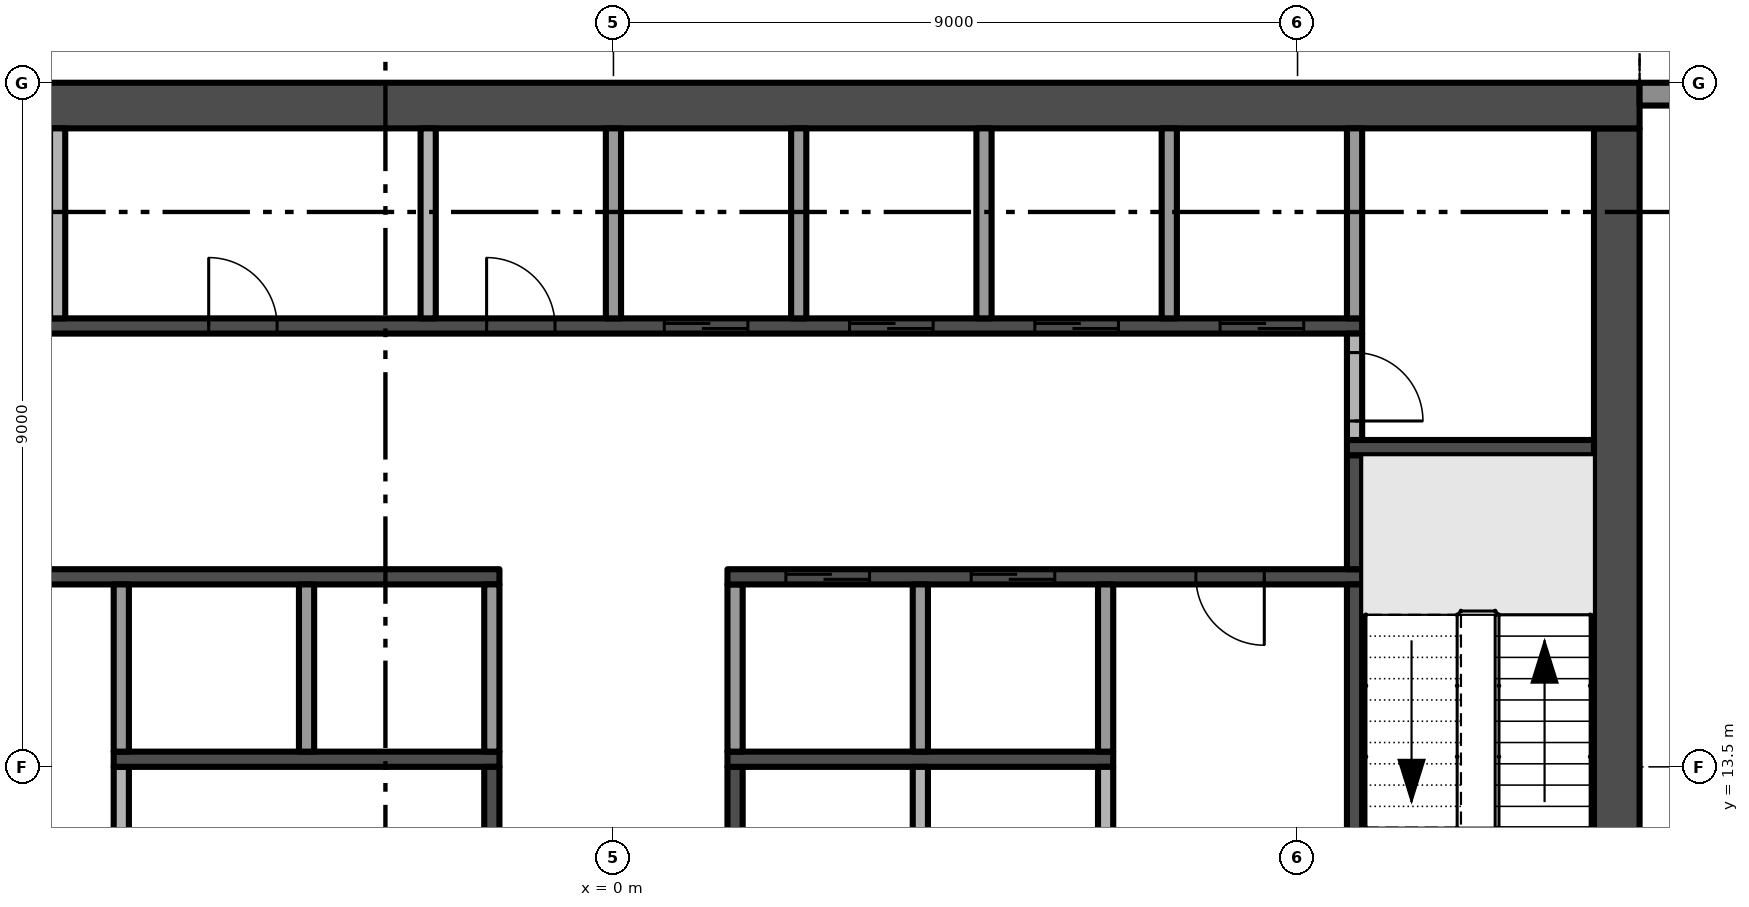
"""IFC4 building model, lengths in metres.
Left out: names, types, materials, properties, quantities, classifications, styles, units other than length and angle.
Written with IfcOpenShell. Run it as: python <this file> out.ifc"""

import sys

from ifc_helpers import new_model, si_unit, direction, frame, frame_2d, origin, place, context, subcontext, project, spatial, polyline, rectangle, outline, extrude, element, fill, save


model = new_model("IFC4")
c1 = context("Model", 3, precision=1e-05, world=origin(), true_north=direction((0.0, 1.0)))
c2 = subcontext(c1, "Body", "Model", "MODEL_VIEW")
j1 = project(units=[si_unit("LENGTHUNIT", "METRE"), si_unit("PLANEANGLEUNIT", "RADIAN")], contexts=[c1])
p1 = place(None, origin())
s1 = spatial("IfcSite", under=j1, at=p1, CompositionType="ELEMENT")
p2 = place(p1, origin())
s2 = spatial("IfcBuilding", under=s1, at=p2, CompositionType="ELEMENT")
p3 = place(p2, frame((0.0, 0.0, 254.0)))
s3 = spatial("IfcBuildingStorey", under=s2, at=p3, CompositionType="ELEMENT", Elevation=254.0)
p4 = place(p3, frame((13.2, 5.1, -0.3), z_axis=(0.0, 0.0, 1.0), x_axis=(0.0, 1.0, 0.0)))
e1 = element("IfcWall", 1, at=p4, inside=s3, PredefinedType="SHEAR", context=c2, shape_type="SweptSolid", body=[
    extrude(rectangle(XDim=16.8, YDim=0.6, at=frame_2d((8.4, 0.0))), origin(), (0.0, 0.0, 1.0), 3.8),
])
p5 = place(p4, frame((6.3, 0.0, 0.3)))
e2 = element("IfcOpeningElement", 2, at=p5, cuts=e1, PredefinedType="OPENING", context=c2, shape_type="SweptSolid", body=[
    extrude(rectangle(XDim=1.2, YDim=2.2, at=frame_2d((0.6, 1.1))), frame((0.0, 0.31, 0.0), z_axis=(0.0, -1.0, 0.0), x_axis=(1.0, 0.0, 0.0)), (0.0, 0.0, 1.0), 0.62),
])
p6 = place(p3, frame((13.5, 22.2, -0.3), z_axis=(0.0, 0.0, 1.0), x_axis=(-1.0, 0.0, 0.0)))
e3 = element("IfcWall", 3, at=p6, inside=s3, PredefinedType="SHEAR", context=c2, shape_type="SweptSolid", body=[
    extrude(rectangle(XDim=27.0, YDim=0.6, at=frame_2d((13.5, 0.0))), origin(), (0.0, 0.0, 1.0), 3.8),
])
p7 = place(p3, frame((13.5, 22.35, 0.0), z_axis=(0.0, 0.0, 1.0), x_axis=(1.0, 0.0, 0.0)))
e4 = element("IfcWall", 4, at=p7, inside=s3, PredefinedType="SOLIDWALL", context=c2, shape_type="SweptSolid", body=[
    extrude(rectangle(XDim=4.05, YDim=0.3, at=frame_2d((2.025, 0.0))), origin(), (0.0, 0.0, 1.0), 3.5),
])
p8 = place(p7, frame((0.55, 0.0, 0.45)))
e5 = element("IfcOpeningElement", 5, at=p8, cuts=e4, PredefinedType="OPENING", context=c2, shape_type="SweptSolid", body=[
    extrude(rectangle(XDim=3.2, YDim=2.65, at=frame_2d((1.6, 1.325))), frame((0.0, 0.16, 0.0), z_axis=(0.0, -1.0, 0.0), x_axis=(1.0, 0.0, 0.0)), (0.0, 0.0, 1.0), 0.32),
])
p9 = place(p3, origin())
e6 = element("IfcWall", 6, at=p9, inside=s3, PredefinedType="USERDEFINED", context=c2, shape_type="SweptSolid", body=[
    extrude(outline(polyline([(22.5, 25.149), (21.0, 24.488), (19.5, 23.755), (18.0, 23.231), (16.875, 23.1), (16.5, 23.115), (15.0, 23.451), (13.5, 24.112), (13.399, 23.883), (14.921, 23.213), (16.467, 22.866), (16.885, 22.849), (18.056, 22.986), (19.596, 23.524), (21.105, 24.261), (22.601, 24.92), (22.5, 25.149)])), origin(), (0.0, 0.0, 1.0), 0.9),
])
p10 = place(p3, frame((-1.5, 16.0, 0.0), z_axis=(0.0, 0.0, 1.0), x_axis=(-1.0, 0.0, 0.0)))
e7 = element("IfcWall", 7, at=p10, inside=s3, PredefinedType="SHEAR", context=c2, shape_type="SweptSolid", body=[
    extrude(rectangle(XDim=8.35, YDim=0.2, at=frame_2d((4.175, 0.0))), origin(), (0.0, 0.0, 1.0), 3.5),
])
p11 = place(p10, frame((6.162, 0.0, 0.0)))
e8 = element("IfcOpeningElement", 8, at=p11, cuts=e7, PredefinedType="OPENING", context=c2, shape_type="SweptSolid", body=[
    extrude(rectangle(XDim=0.9, YDim=2.1, at=frame_2d((0.45, 1.05))), frame((0.0, 0.11, 0.0), z_axis=(0.0, -1.0, 0.0), x_axis=(1.0, 0.0, 0.0)), (0.0, 0.0, 1.0), 0.22),
])
p12 = place(p3, frame((-9.85, 19.3, 0.0), z_axis=(0.0, 0.0, 1.0), x_axis=(1.0, 0.0, 0.0)))
e9 = element("IfcWall", 9, at=p12, inside=s3, PredefinedType="SHEAR", context=c2, shape_type="SweptSolid", body=[
    extrude(rectangle(XDim=19.7, YDim=0.2, at=frame_2d((9.85, 0.0))), origin(), (0.0, 0.0, 1.0), 3.5),
])
p13 = place(p12, frame((10.519, 0.0, 0.0)))
e10 = element("IfcOpeningElement", 10, at=p13, cuts=e9, PredefinedType="OPENING", context=c2, shape_type="SweptSolid", body=[
    extrude(rectangle(XDim=1.1, YDim=2.1, at=frame_2d((0.55, 1.05))), frame((0.0, 0.11, 0.0), z_axis=(0.0, -1.0, 0.0), x_axis=(1.0, 0.0, 0.0)), (0.0, 0.0, 1.0), 0.22),
])
p14 = place(p12, frame((12.956, 0.0, 0.0)))
e11 = element("IfcOpeningElement", 11, at=p14, cuts=e9, PredefinedType="OPENING", context=c2, shape_type="SweptSolid", body=[
    extrude(rectangle(XDim=1.1, YDim=2.1, at=frame_2d((0.55, 1.05))), frame((0.0, 0.11, 0.0), z_axis=(0.0, -1.0, 0.0), x_axis=(1.0, 0.0, 0.0)), (0.0, 0.0, 1.0), 0.22),
])
p15 = place(p12, frame((15.394, 0.0, 0.0)))
e12 = element("IfcOpeningElement", 12, at=p15, cuts=e9, PredefinedType="OPENING", context=c2, shape_type="SweptSolid", body=[
    extrude(rectangle(XDim=1.1, YDim=2.1, at=frame_2d((0.55, 1.05))), frame((0.0, 0.11, 0.0), z_axis=(0.0, -1.0, 0.0), x_axis=(1.0, 0.0, 0.0)), (0.0, 0.0, 1.0), 0.22),
])
p16 = place(p12, frame((17.831, 0.0, 0.0)))
e13 = element("IfcOpeningElement", 13, at=p16, cuts=e9, PredefinedType="OPENING", context=c2, shape_type="SweptSolid", body=[
    extrude(rectangle(XDim=1.1, YDim=2.1, at=frame_2d((0.55, 1.05))), frame((0.0, 0.11, 0.0), z_axis=(0.0, -1.0, 0.0), x_axis=(1.0, 0.0, 0.0)), (0.0, 0.0, 1.0), 0.22),
])
p17 = place(p12, frame((0.869, 0.0, 0.0)))
e14 = element("IfcOpeningElement", 14, at=p17, cuts=e9, PredefinedType="OPENING", context=c2, shape_type="SweptSolid", body=[
    extrude(rectangle(XDim=0.9, YDim=2.1, at=frame_2d((0.45, 1.05))), frame((0.0, 0.11, 0.0), z_axis=(0.0, -1.0, 0.0), x_axis=(1.0, 0.0, 0.0)), (0.0, 0.0, 1.0), 0.22),
])
p18 = place(p12, frame((4.525, 0.0, 0.0)))
e15 = element("IfcOpeningElement", 15, at=p18, cuts=e9, PredefinedType="OPENING", context=c2, shape_type="SweptSolid", body=[
    extrude(rectangle(XDim=0.9, YDim=2.1, at=frame_2d((0.45, 1.05))), frame((0.0, 0.11, 0.0), z_axis=(0.0, -1.0, 0.0), x_axis=(1.0, 0.0, 0.0)), (0.0, 0.0, 1.0), 0.22),
])
p19 = place(p12, frame((8.181, 0.0, 0.0)))
e16 = element("IfcOpeningElement", 16, at=p19, cuts=e9, PredefinedType="OPENING", context=c2, shape_type="SweptSolid", body=[
    extrude(rectangle(XDim=0.9, YDim=2.1, at=frame_2d((0.45, 1.05))), frame((0.0, 0.11, 0.0), z_axis=(0.0, -1.0, 0.0), x_axis=(1.0, 0.0, 0.0)), (0.0, 0.0, 1.0), 0.22),
])
p20 = place(p3, frame((-7.312, 19.4, 0.0), z_axis=(0.0, 0.0, 1.0), x_axis=(0.0, 1.0, 0.0)))
e17 = element("IfcWall", 17, at=p20, inside=s3, PredefinedType="PARTITIONING", context=c2, shape_type="SweptSolid", body=[
    extrude(rectangle(XDim=2.5, YDim=0.2, at=frame_2d((1.25, 0.0))), origin(), (0.0, 0.0, 1.0), 3.5),
])
p21 = place(p3, frame((-6.475, 8.15, 0.0), z_axis=(0.0, 0.0, 1.0), x_axis=(0.0, 1.0, 0.0)))
e18 = element("IfcWall", 18, at=p21, inside=s3, PredefinedType="PARTITIONING", context=c2, shape_type="SweptSolid", body=[
    extrude(rectangle(XDim=5.35, YDim=0.2, at=frame_2d((2.675, 0.0))), origin(), (0.0, 0.0, 1.0), 3.5),
])
p22 = place(p3, frame((-6.575, 13.6, 0.0), z_axis=(0.0, 0.0, 1.0), x_axis=(1.0, 0.0, 0.0)))
e19 = element("IfcWall", 19, at=p22, inside=s3, PredefinedType="SHEAR", context=c2, shape_type="SweptSolid", body=[
    extrude(rectangle(XDim=5.075, YDim=0.2, at=frame_2d((2.538, 0.0))), origin(), (0.0, 0.0, 1.0), 3.5),
])
for number, where, z_axis, x_axis in (
    (20, (-6.475, 13.7, 0.0), (0.0, 0.0, 1.0), (0.0, 1.0, 0.0)),
    (21, (-4.037, 13.7, 0.0), (0.0, 0.0, 1.0), (0.0, 1.0, 0.0)),
):
    element("IfcWall", number, at=place(p3, frame(where, z_axis=z_axis, x_axis=x_axis)), inside=s3, PredefinedType="PARTITIONING", context=c2, shape_type="SweptSolid", body=[
        extrude(rectangle(XDim=2.2, YDim=0.2, at=frame_2d((1.1, 0.0))), origin(), (0.0, 0.0, 1.0), 3.5),
    ])
p23 = place(p3, frame((-2.438, 19.4, 0.0), z_axis=(0.0, 0.0, 1.0), x_axis=(0.0, 1.0, 0.0)))
e22 = element("IfcWall", 22, at=p23, inside=s3, PredefinedType="PARTITIONING", context=c2, shape_type="SweptSolid", body=[
    extrude(rectangle(XDim=2.5, YDim=0.2, at=frame_2d((1.25, 0.0))), origin(), (0.0, 0.0, 1.0), 3.5),
])
p24 = place(p3, frame((-1.6, 8.15, 0.0), z_axis=(0.0, 0.0, 1.0), x_axis=(0.0, 1.0, 0.0)))
e23 = element("IfcWall", 23, at=p24, inside=s3, PredefinedType="SHEAR", context=c2, shape_type="SweptSolid", body=[
    extrude(rectangle(XDim=5.35, YDim=0.2, at=frame_2d((2.675, 0.0))), origin(), (0.0, 0.0, 1.0), 3.5),
])
p25 = place(p24, frame((2.225, 0.0, 0.0)))
e24 = element("IfcOpeningElement", 24, at=p25, cuts=e23, PredefinedType="OPENING", context=c2, shape_type="SweptSolid", body=[
    extrude(rectangle(XDim=0.9, YDim=2.1, at=frame_2d((0.45, 1.05))), frame((0.0, 0.11, 0.0), z_axis=(0.0, -1.0, 0.0), x_axis=(1.0, 0.0, 0.0)), (0.0, 0.0, 1.0), 0.22),
])
p26 = place(p3, frame((-1.6, 13.7, 0.0), z_axis=(0.0, 0.0, 1.0), x_axis=(0.0, 1.0, 0.0)))
e25 = element("IfcWall", 25, at=p26, inside=s3, PredefinedType="PARTITIONING", context=c2, shape_type="SweptSolid", body=[
    extrude(rectangle(XDim=2.2, YDim=0.2, at=frame_2d((1.1, 0.0))), origin(), (0.0, 0.0, 1.0), 3.5),
])
p27 = place(p3, frame((0.0, 19.4, 0.0), z_axis=(0.0, 0.0, 1.0), x_axis=(0.0, 1.0, 0.0)))
e26 = element("IfcWall", 26, at=p27, inside=s3, PredefinedType="PARTITIONING", context=c2, shape_type="SweptSolid", body=[
    extrude(rectangle(XDim=2.5, YDim=0.2, at=frame_2d((1.25, 0.0))), origin(), (0.0, 0.0, 1.0), 3.5),
])
p28 = place(p3, frame((1.6, 13.5, 0.0), z_axis=(0.0, 0.0, 1.0), x_axis=(0.0, -1.0, 0.0)))
e27 = element("IfcWall", 27, at=p28, inside=s3, PredefinedType="SHEAR", context=c2, shape_type="SweptSolid", body=[
    extrude(rectangle(XDim=3.5, YDim=0.2, at=frame_2d((1.75, 0.0))), origin(), (0.0, 0.0, 1.0), 3.5),
])
p29 = place(p28, frame((1.3, 0.0, 0.0)))
e28 = element("IfcOpeningElement", 28, at=p29, cuts=e27, PredefinedType="OPENING", context=c2, shape_type="SweptSolid", body=[
    extrude(rectangle(XDim=0.9, YDim=2.1, at=frame_2d((0.45, 1.05))), frame((0.0, 0.11, 0.0), z_axis=(0.0, -1.0, 0.0), x_axis=(1.0, 0.0, 0.0)), (0.0, 0.0, 1.0), 0.22),
])
p30 = place(p3, frame((1.5, 13.6, 0.0), z_axis=(0.0, 0.0, 1.0), x_axis=(1.0, 0.0, 0.0)))
e29 = element("IfcWall", 29, at=p30, inside=s3, PredefinedType="SHEAR", context=c2, shape_type="SweptSolid", body=[
    extrude(rectangle(XDim=5.075, YDim=0.2, at=frame_2d((2.538, 0.0))), origin(), (0.0, 0.0, 1.0), 3.5),
])
p31 = place(p3, frame((1.6, 13.7, 0.0), z_axis=(0.0, 0.0, 1.0), x_axis=(0.0, 1.0, 0.0)))
e30 = element("IfcWall", 30, at=p31, inside=s3, PredefinedType="PARTITIONING", context=c2, shape_type="SweptSolid", body=[
    extrude(rectangle(XDim=2.2, YDim=0.2, at=frame_2d((1.1, 0.0))), origin(), (0.0, 0.0, 1.0), 3.5),
])
p32 = place(p3, frame((9.85, 16.0, 0.0), z_axis=(0.0, 0.0, 1.0), x_axis=(-1.0, 0.0, 0.0)))
e31 = element("IfcWall", 31, at=p32, inside=s3, PredefinedType="SHEAR", context=c2, shape_type="SweptSolid", body=[
    extrude(rectangle(XDim=8.35, YDim=0.2, at=frame_2d((4.175, 0.0))), origin(), (0.0, 0.0, 1.0), 3.5),
])
p33 = place(p32, frame((6.481, 0.0, 0.0)))
e32 = element("IfcOpeningElement", 32, at=p33, cuts=e31, PredefinedType="OPENING", context=c2, shape_type="SweptSolid", body=[
    extrude(rectangle(XDim=1.1, YDim=2.1, at=frame_2d((0.55, 1.05))), frame((0.0, 0.11, 0.0), z_axis=(0.0, -1.0, 0.0), x_axis=(1.0, 0.0, 0.0)), (0.0, 0.0, 1.0), 0.22),
])
p34 = place(p32, frame((4.044, 0.0, 0.0)))
e33 = element("IfcOpeningElement", 33, at=p34, cuts=e31, PredefinedType="OPENING", context=c2, shape_type="SweptSolid", body=[
    extrude(rectangle(XDim=1.1, YDim=2.1, at=frame_2d((0.55, 1.05))), frame((0.0, 0.11, 0.0), z_axis=(0.0, -1.0, 0.0), x_axis=(1.0, 0.0, 0.0)), (0.0, 0.0, 1.0), 0.22),
])
p35 = place(p32, frame((1.288, 0.0, 0.0)))
e34 = element("IfcOpeningElement", 34, at=p35, cuts=e31, PredefinedType="OPENING", context=c2, shape_type="SweptSolid", body=[
    extrude(rectangle(XDim=0.9, YDim=2.1, at=frame_2d((0.45, 1.05))), frame((0.0, 0.11, 0.0), z_axis=(0.0, -1.0, 0.0), x_axis=(1.0, 0.0, 0.0)), (0.0, 0.0, 1.0), 0.22),
])
p36 = place(p3, frame((2.438, 19.4, 0.0), z_axis=(0.0, 0.0, 1.0), x_axis=(0.0, 1.0, 0.0)))
e35 = element("IfcWall", 35, at=p36, inside=s3, PredefinedType="PARTITIONING", context=c2, shape_type="SweptSolid", body=[
    extrude(rectangle(XDim=2.5, YDim=0.2, at=frame_2d((1.25, 0.0))), origin(), (0.0, 0.0, 1.0), 3.5),
])
p37 = place(p3, frame((4.037, 10.0, 0.0), z_axis=(0.0, 0.0, 1.0), x_axis=(0.0, 1.0, 0.0)))
e36 = element("IfcWall", 36, at=p37, inside=s3, PredefinedType="PARTITIONING", context=c2, shape_type="SweptSolid", body=[
    extrude(rectangle(XDim=3.5, YDim=0.2, at=frame_2d((1.75, 0.0))), origin(), (0.0, 0.0, 1.0), 3.5),
])
p38 = place(p3, frame((4.037, 13.7, 0.0), z_axis=(0.0, 0.0, 1.0), x_axis=(0.0, 1.0, 0.0)))
e37 = element("IfcWall", 37, at=p38, inside=s3, PredefinedType="PARTITIONING", context=c2, shape_type="SweptSolid", body=[
    extrude(rectangle(XDim=2.2, YDim=0.2, at=frame_2d((1.1, 0.0))), origin(), (0.0, 0.0, 1.0), 3.5),
])
p39 = place(p3, frame((4.875, 19.4, 0.0), z_axis=(0.0, 0.0, 1.0), x_axis=(0.0, 1.0, 0.0)))
e38 = element("IfcWall", 38, at=p39, inside=s3, PredefinedType="PARTITIONING", context=c2, shape_type="SweptSolid", body=[
    extrude(rectangle(XDim=2.5, YDim=0.2, at=frame_2d((1.25, 0.0))), origin(), (0.0, 0.0, 1.0), 3.5),
])
p40 = place(p3, frame((6.475, 12.3, 0.0), z_axis=(0.0, 0.0, 1.0), x_axis=(0.0, 1.0, 0.0)))
e39 = element("IfcWall", 39, at=p40, inside=s3, PredefinedType="PARTITIONING", context=c2, shape_type="SweptSolid", body=[
    extrude(rectangle(XDim=1.2, YDim=0.2, at=frame_2d((0.6, 0.0))), origin(), (0.0, 0.0, 1.0), 3.5),
])
p41 = place(p3, frame((6.475, 13.7, 0.0), z_axis=(0.0, 0.0, 1.0), x_axis=(0.0, 1.0, 0.0)))
e40 = element("IfcWall", 40, at=p41, inside=s3, PredefinedType="PARTITIONING", context=c2, shape_type="SweptSolid", body=[
    extrude(rectangle(XDim=2.2, YDim=0.2, at=frame_2d((1.1, 0.0))), origin(), (0.0, 0.0, 1.0), 3.5),
])
p42 = place(p3, frame((7.312, 19.4, 0.0), z_axis=(0.0, 0.0, 1.0), x_axis=(0.0, 1.0, 0.0)))
e41 = element("IfcWall", 41, at=p42, inside=s3, PredefinedType="PARTITIONING", context=c2, shape_type="SweptSolid", body=[
    extrude(rectangle(XDim=2.5, YDim=0.2, at=frame_2d((1.25, 0.0))), origin(), (0.0, 0.0, 1.0), 3.5),
])
p43 = place(p3, frame((9.75, 12.3, 0.0), z_axis=(0.0, 0.0, 1.0), x_axis=(0.0, 1.0, 0.0)))
e42 = element("IfcWall", 42, at=p43, inside=s3, PredefinedType="SHEAR", context=c2, shape_type="SweptSolid", body=[
    extrude(rectangle(XDim=3.6, YDim=0.2, at=frame_2d((1.8, 0.0))), origin(), (0.0, 0.0, 1.0), 3.5),
])
p44 = place(p3, frame((9.75, 16.1, 0.0), z_axis=(0.0, 0.0, 1.0), x_axis=(0.0, 1.0, 0.0)))
e43 = element("IfcWall", 43, at=p44, inside=s3, PredefinedType="SHEAR", context=c2, shape_type="SweptSolid", body=[
    extrude(rectangle(XDim=1.5, YDim=0.2, at=frame_2d((0.75, 0.0))), origin(), (0.0, 0.0, 1.0), 3.5),
])
p45 = place(p3, frame((9.65, 17.7, 0.0), z_axis=(0.0, 0.0, 1.0), x_axis=(1.0, 0.0, 0.0)))
e44 = element("IfcWall", 44, at=p45, inside=s3, PredefinedType="SHEAR", context=c2, shape_type="SweptSolid", body=[
    extrude(rectangle(XDim=3.25, YDim=0.2, at=frame_2d((1.625, 0.0))), origin(), (0.0, 0.0, 1.0), 3.5),
])
p46 = place(p3, frame((9.75, 19.2, 0.0), z_axis=(0.0, 0.0, 1.0), x_axis=(0.0, -1.0, 0.0)))
e45 = element("IfcWall", 45, at=p46, inside=s3, PredefinedType="PARTITIONING", context=c2, shape_type="SweptSolid", body=[
    extrude(rectangle(XDim=1.4, YDim=0.2, at=frame_2d((0.7, 0.0))), origin(), (0.0, 0.0, 1.0), 3.5),
])
p47 = place(p46, frame((0.25, 0.0, 0.0)))
e46 = element("IfcOpeningElement", 46, at=p47, cuts=e45, PredefinedType="OPENING", context=c2, shape_type="SweptSolid", body=[
    extrude(rectangle(XDim=0.9, YDim=2.1, at=frame_2d((0.45, 1.05))), frame((0.0, 0.11, 0.0), z_axis=(0.0, -1.0, 0.0), x_axis=(1.0, 0.0, 0.0)), (0.0, 0.0, 1.0), 0.22),
])
p48 = place(p3, frame((9.75, 19.4, 0.0), z_axis=(0.0, 0.0, 1.0), x_axis=(0.0, 1.0, 0.0)))
e47 = element("IfcWall", 47, at=p48, inside=s3, PredefinedType="PARTITIONING", context=c2, shape_type="SweptSolid", body=[
    extrude(rectangle(XDim=2.5, YDim=0.2, at=frame_2d((1.25, 0.0))), origin(), (0.0, 0.0, 1.0), 3.5),
])
p49 = place(p13, origin())
e48 = element("IfcDoor", 48, at=p49, inside=s3, OperationType="SLIDING_TO_RIGHT", PredefinedType="DOOR", context=c2, shape_type="SweptSolid", body=[
    extrude(rectangle(XDim=1.1, YDim=2.1, at=frame_2d((0.55, 1.05))), frame((0.0, 0.025, 0.0), z_axis=(0.0, -1.0, 0.0), x_axis=(1.0, 0.0, 0.0)), (0.0, 0.0, 1.0), 0.05),
])
fill(e10, e48)
p50 = place(p14, origin())
e49 = element("IfcDoor", 49, at=p50, inside=s3, OperationType="SLIDING_TO_RIGHT", PredefinedType="DOOR", context=c2, shape_type="SweptSolid", body=[
    extrude(rectangle(XDim=1.1, YDim=2.1, at=frame_2d((0.55, 1.05))), frame((0.0, 0.025, 0.0), z_axis=(0.0, -1.0, 0.0), x_axis=(1.0, 0.0, 0.0)), (0.0, 0.0, 1.0), 0.05),
])
fill(e11, e49)
p51 = place(p15, origin())
e50 = element("IfcDoor", 50, at=p51, inside=s3, OperationType="SLIDING_TO_RIGHT", PredefinedType="DOOR", context=c2, shape_type="SweptSolid", body=[
    extrude(rectangle(XDim=1.1, YDim=2.1, at=frame_2d((0.55, 1.05))), frame((0.0, 0.025, 0.0), z_axis=(0.0, -1.0, 0.0), x_axis=(1.0, 0.0, 0.0)), (0.0, 0.0, 1.0), 0.05),
])
fill(e12, e50)
p52 = place(p16, origin())
e51 = element("IfcDoor", 51, at=p52, inside=s3, OperationType="SLIDING_TO_RIGHT", PredefinedType="DOOR", context=c2, shape_type="SweptSolid", body=[
    extrude(rectangle(XDim=1.1, YDim=2.1, at=frame_2d((0.55, 1.05))), frame((0.0, 0.025, 0.0), z_axis=(0.0, -1.0, 0.0), x_axis=(1.0, 0.0, 0.0)), (0.0, 0.0, 1.0), 0.05),
])
fill(e13, e51)
p53 = place(p33, origin())
e52 = element("IfcDoor", 52, at=p53, inside=s3, OperationType="SLIDING_TO_RIGHT", PredefinedType="DOOR", context=c2, shape_type="SweptSolid", body=[
    extrude(rectangle(XDim=1.1, YDim=2.1, at=frame_2d((0.55, 1.05))), frame((0.0, 0.025, 0.0), z_axis=(0.0, -1.0, 0.0), x_axis=(1.0, 0.0, 0.0)), (0.0, 0.0, 1.0), 0.05),
])
fill(e32, e52)
p54 = place(p34, origin())
e53 = element("IfcDoor", 53, at=p54, inside=s3, OperationType="SLIDING_TO_RIGHT", PredefinedType="DOOR", context=c2, shape_type="SweptSolid", body=[
    extrude(rectangle(XDim=1.1, YDim=2.1, at=frame_2d((0.55, 1.05))), frame((0.0, 0.025, 0.0), z_axis=(0.0, -1.0, 0.0), x_axis=(1.0, 0.0, 0.0)), (0.0, 0.0, 1.0), 0.05),
])
fill(e33, e53)
p55 = place(p35, origin())
e54 = element("IfcDoor", 54, at=p55, inside=s3, OperationType="SINGLE_SWING_LEFT", PredefinedType="DOOR", context=c2, shape_type="SweptSolid", body=[
    extrude(rectangle(XDim=0.9, YDim=2.1, at=frame_2d((0.45, 1.05))), frame((0.0, 0.025, 0.0), z_axis=(0.0, -1.0, 0.0), x_axis=(1.0, 0.0, 0.0)), (0.0, 0.0, 1.0), 0.05),
])
fill(e34, e54)
p56 = place(p47, origin())
e55 = element("IfcDoor", 55, at=p56, inside=s3, OperationType="SINGLE_SWING_RIGHT", PredefinedType="DOOR", context=c2, shape_type="SweptSolid", body=[
    extrude(rectangle(XDim=0.9, YDim=2.1, at=frame_2d((0.45, 1.05))), frame((0.0, 0.025, 0.0), z_axis=(0.0, -1.0, 0.0), x_axis=(1.0, 0.0, 0.0)), (0.0, 0.0, 1.0), 0.05),
])
fill(e46, e55)
p57 = place(p18, origin())
e56 = element("IfcDoor", 56, at=p57, inside=s3, OperationType="SINGLE_SWING_LEFT", PredefinedType="DOOR", context=c2, shape_type="SweptSolid", body=[
    extrude(rectangle(XDim=0.9, YDim=2.1, at=frame_2d((0.45, 1.05))), frame((0.0, 0.025, 0.0), z_axis=(0.0, -1.0, 0.0), x_axis=(1.0, 0.0, 0.0)), (0.0, 0.0, 1.0), 0.05),
])
fill(e15, e56)
p58 = place(p19, origin())
e57 = element("IfcDoor", 57, at=p58, inside=s3, OperationType="SINGLE_SWING_LEFT", PredefinedType="DOOR", context=c2, shape_type="SweptSolid", body=[
    extrude(rectangle(XDim=0.9, YDim=2.1, at=frame_2d((0.45, 1.05))), frame((0.0, 0.025, 0.0), z_axis=(0.0, -1.0, 0.0), x_axis=(1.0, 0.0, 0.0)), (0.0, 0.0, 1.0), 0.05),
])
fill(e16, e57)
save(model, sys.argv[1])
